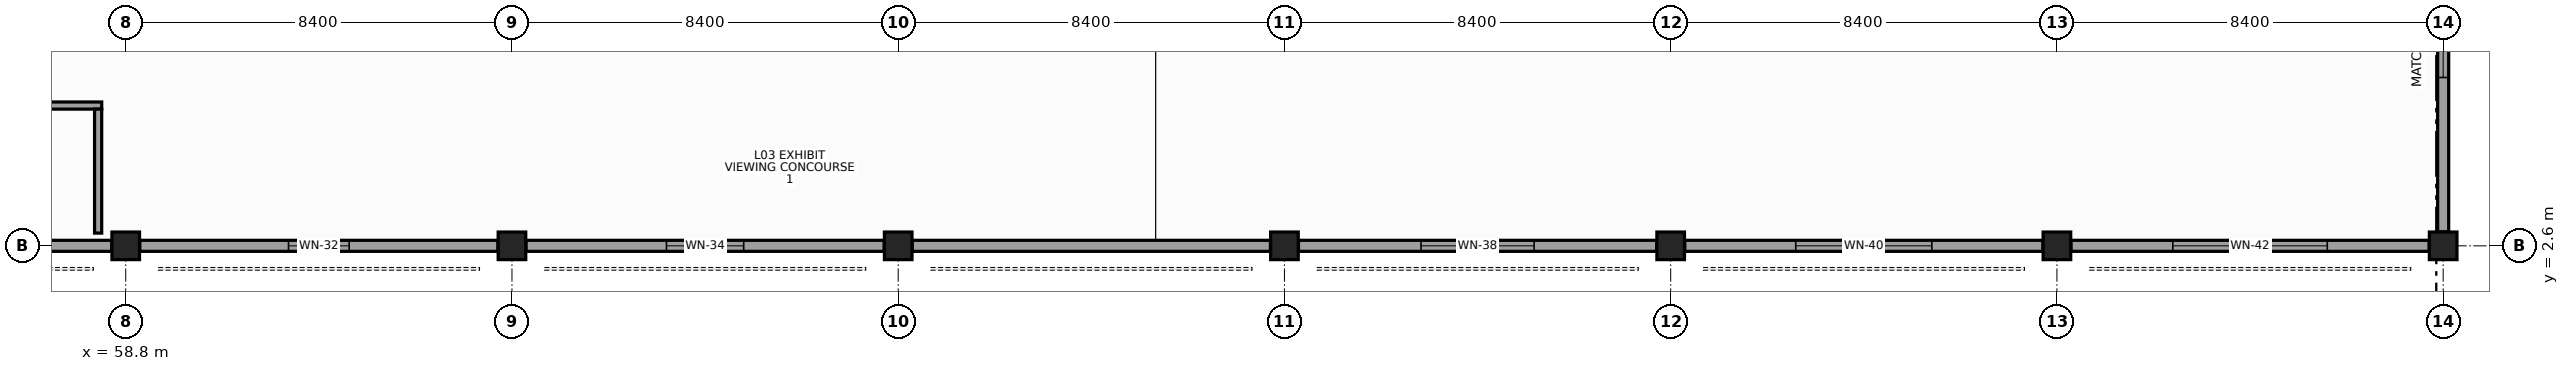
"""IFC4 building model, lengths in metres.
Left out: names, types, materials, properties, quantities, classifications, styles, units other than length and angle.
Written with IfcOpenShell. Run it as: python <this file> out.ifc"""

import sys

from ifc_helpers import new_model, si_unit, direction, frame, frame_2d, origin, origin_2d, place, context, subcontext, project, spatial, rectangle, extrude, element, fill, save


model = new_model("IFC4")
c1 = context("Model", 3, precision=1e-05, world=origin(), true_north=direction((0.0, 1.0)))
c2 = subcontext(c1, "Body", "Model", "MODEL_VIEW")
j1 = project(units=[si_unit("LENGTHUNIT", "METRE"), si_unit("PLANEANGLEUNIT", "RADIAN")], contexts=[c1])
p1 = place(None, origin())
s1 = spatial("IfcSite", under=j1, at=p1, CompositionType="ELEMENT")
p2 = place(p1, origin())
s2 = spatial("IfcBuilding", under=s1, at=p2, CompositionType="ELEMENT")
p3 = place(p2, frame((0.0, 0.0, 15.6)))
s3 = spatial("IfcBuildingStorey", under=s2, at=p3, CompositionType="ELEMENT", Elevation=15.6)
for number, where, z_axis, x_axis in (
    (1, (58.8, 2.6, 0.0), (0.0, 0.0, 1.0), (1.0, 0.0, 0.0)),
    (2, (67.2, 2.6, 0.0), (0.0, 0.0, 1.0), (1.0, 0.0, 0.0)),
    (3, (75.6, 2.6, 0.0), (0.0, 0.0, 1.0), (1.0, 0.0, 0.0)),
    (4, (84.0, 2.6, 0.0), (0.0, 0.0, 1.0), (1.0, 0.0, 0.0)),
    (5, (92.4, 2.6, 0.0), (0.0, 0.0, 1.0), (1.0, 0.0, 0.0)),
    (6, (100.8, 2.6, 0.0), (0.0, 0.0, 1.0), (1.0, 0.0, 0.0)),
    (7, (109.2, 2.6, 0.0), (0.0, 0.0, 1.0), (1.0, 0.0, 0.0)),
):
    element("IfcColumn", number, at=place(p3, frame(where, z_axis=z_axis, x_axis=x_axis)), inside=s3, PredefinedType="COLUMN", context=c2, shape_type="SweptSolid", body=[
        extrude(rectangle(XDim=0.6, YDim=0.6, at=origin_2d()), origin(), (0.0, 0.0, 1.0), 4.5),
    ])
p4 = place(p3, frame((50.705, 2.6, 0.0), z_axis=(0.0, 0.0, 1.0), x_axis=(1.0, 0.0, 0.0)))
e8 = element("IfcWall", 8, at=p4, inside=s3, PredefinedType="STANDARD", context=c2, shape_type="SweptSolid", body=[
    extrude(rectangle(XDim=7.79, YDim=0.24, at=frame_2d((3.895, 0.0))), origin(), (0.0, 0.0, 1.0), 3.33),
])
p5 = place(p3, frame((59.105, 2.6, 0.0), z_axis=(0.0, 0.0, 1.0), x_axis=(1.0, 0.0, 0.0)))
e9 = element("IfcWall", 9, at=p5, inside=s3, PredefinedType="STANDARD", context=c2, shape_type="SweptSolid", body=[
    extrude(rectangle(XDim=7.79, YDim=0.24, at=frame_2d((3.895, 0.0))), origin(), (0.0, 0.0, 1.0), 3.33),
])
p6 = place(p5, frame((3.235, 0.0, 0.95)))
e10 = element("IfcOpeningElement", 10, at=p6, cuts=e9, PredefinedType="OPENING", context=c2, shape_type="SweptSolid", body=[
    extrude(rectangle(XDim=1.32, YDim=2.0, at=frame_2d((0.66, 1.0))), frame((0.0, 0.13, 0.0), z_axis=(0.0, -1.0, 0.0), x_axis=(1.0, 0.0, 0.0)), (0.0, 0.0, 1.0), 0.26),
])
p7 = place(p3, frame((67.505, 2.6, 0.0), z_axis=(0.0, 0.0, 1.0), x_axis=(1.0, 0.0, 0.0)))
e11 = element("IfcWall", 11, at=p7, inside=s3, PredefinedType="STANDARD", context=c2, shape_type="SweptSolid", body=[
    extrude(rectangle(XDim=7.79, YDim=0.24, at=frame_2d((3.895, 0.0))), origin(), (0.0, 0.0, 1.0), 3.33),
])
p8 = place(p7, frame((3.055, 0.0, 0.95)))
e12 = element("IfcOpeningElement", 12, at=p8, cuts=e11, PredefinedType="OPENING", context=c2, shape_type="SweptSolid", body=[
    extrude(rectangle(XDim=1.68, YDim=2.08, at=frame_2d((0.84, 1.04))), frame((0.0, 0.13, 0.0), z_axis=(0.0, -1.0, 0.0), x_axis=(1.0, 0.0, 0.0)), (0.0, 0.0, 1.0), 0.26),
])
p9 = place(p3, frame((75.905, 2.6, 0.0), z_axis=(0.0, 0.0, 1.0), x_axis=(1.0, 0.0, 0.0)))
e13 = element("IfcWall", 13, at=p9, inside=s3, PredefinedType="STANDARD", context=c2, shape_type="SweptSolid", body=[
    extrude(rectangle(XDim=7.79, YDim=0.24, at=frame_2d((3.895, 0.0))), origin(), (0.0, 0.0, 1.0), 3.33),
])
p10 = place(p3, frame((84.305, 2.6, 0.0), z_axis=(0.0, 0.0, 1.0), x_axis=(1.0, 0.0, 0.0)))
e14 = element("IfcWall", 14, at=p10, inside=s3, PredefinedType="STANDARD", context=c2, shape_type="SweptSolid", body=[
    extrude(rectangle(XDim=7.79, YDim=0.24, at=frame_2d((3.895, 0.0))), origin(), (0.0, 0.0, 1.0), 3.33),
])
p11 = place(p10, frame((2.665, 0.0, 0.95)))
e15 = element("IfcOpeningElement", 15, at=p11, cuts=e14, PredefinedType="OPENING", context=c2, shape_type="SweptSolid", body=[
    extrude(rectangle(XDim=2.46, YDim=2.14, at=frame_2d((1.23, 1.07))), frame((0.0, 0.13, 0.0), z_axis=(0.0, -1.0, 0.0), x_axis=(1.0, 0.0, 0.0)), (0.0, 0.0, 1.0), 0.26),
])
p12 = place(p3, frame((92.705, 2.6, 0.0), z_axis=(0.0, 0.0, 1.0), x_axis=(1.0, 0.0, 0.0)))
e16 = element("IfcWall", 16, at=p12, inside=s3, PredefinedType="STANDARD", context=c2, shape_type="SweptSolid", body=[
    extrude(rectangle(XDim=7.79, YDim=0.24, at=frame_2d((3.895, 0.0))), origin(), (0.0, 0.0, 1.0), 3.33),
])
p13 = place(p12, frame((2.415, 0.0, 0.95)))
e17 = element("IfcOpeningElement", 17, at=p13, cuts=e16, PredefinedType="OPENING", context=c2, shape_type="SweptSolid", body=[
    extrude(rectangle(XDim=2.96, YDim=2.16, at=frame_2d((1.48, 1.08))), frame((0.0, 0.13, 0.0), z_axis=(0.0, -1.0, 0.0), x_axis=(1.0, 0.0, 0.0)), (0.0, 0.0, 1.0), 0.26),
])
p14 = place(p3, frame((101.105, 2.6, 0.0), z_axis=(0.0, 0.0, 1.0), x_axis=(1.0, 0.0, 0.0)))
e18 = element("IfcWall", 18, at=p14, inside=s3, PredefinedType="STANDARD", context=c2, shape_type="SweptSolid", body=[
    extrude(rectangle(XDim=7.79, YDim=0.24, at=frame_2d((3.895, 0.0))), origin(), (0.0, 0.0, 1.0), 3.33),
])
p15 = place(p14, frame((2.215, 0.0, 0.95)))
e19 = element("IfcOpeningElement", 19, at=p15, cuts=e18, PredefinedType="OPENING", context=c2, shape_type="SweptSolid", body=[
    extrude(rectangle(XDim=3.36, YDim=1.96, at=frame_2d((1.68, 0.98))), frame((0.0, 0.13, 0.0), z_axis=(0.0, -1.0, 0.0), x_axis=(1.0, 0.0, 0.0)), (0.0, 0.0, 1.0), 0.26),
])
p16 = place(p3, frame((109.2, 2.905, 0.0), z_axis=(0.0, 0.0, 1.0), x_axis=(0.0, 1.0, 0.0)))
e20 = element("IfcWall", 20, at=p16, inside=s3, PredefinedType="STANDARD", context=c2, shape_type="SweptSolid", body=[
    extrude(rectangle(XDim=8.39, YDim=0.24, at=frame_2d((4.195, 0.0))), origin(), (0.0, 0.0, 1.0), 3.35),
])
p17 = place(p16, frame((3.355, 0.0, 0.95)))
e21 = element("IfcOpeningElement", 21, at=p17, cuts=e20, PredefinedType="OPENING", context=c2, shape_type="SweptSolid", body=[
    extrude(rectangle(XDim=1.68, YDim=2.08, at=frame_2d((0.84, 1.04))), frame((0.0, 0.13, 0.0), z_axis=(0.0, -1.0, 0.0), x_axis=(1.0, 0.0, 0.0)), (0.0, 0.0, 1.0), 0.26),
])
p18 = place(p3, frame((33.922, 5.65, 0.0), z_axis=(0.0, 0.0, 1.0), x_axis=(1.0, 0.0, 0.0)))
e22 = element("IfcWall", 22, at=p18, inside=s3, PredefinedType="PARTITIONING", context=c2, shape_type="SweptSolid", body=[
    extrude(rectangle(XDim=24.356, YDim=0.155, at=frame_2d((12.178, 0.0))), origin(), (0.0, 0.0, 1.0), 3.45),
])
p19 = place(p18, frame((11.238, 0.0, 0.0)))
e23 = element("IfcOpeningElement", 23, at=p19, cuts=e22, PredefinedType="OPENING", context=c2, shape_type="SweptSolid", body=[
    extrude(rectangle(XDim=1.88, YDim=2.42, at=frame_2d((0.94, 1.21))), frame((0.0, 0.087, 0.0), z_axis=(0.0, -1.0, 0.0), x_axis=(1.0, 0.0, 0.0)), (0.0, 0.0, 1.0), 0.175),
])
p20 = place(p18, frame((13.718, 0.0, 1.05)))
e24 = element("IfcOpeningElement", 24, at=p20, cuts=e22, PredefinedType="OPENING", context=c2, shape_type="SweptSolid", body=[
    extrude(rectangle(XDim=2.85, YDim=1.52, at=frame_2d((1.425, 0.76))), frame((0.0, 0.087, 0.0), z_axis=(0.0, -1.0, 0.0), x_axis=(1.0, 0.0, 0.0)), (0.0, 0.0, 1.0), 0.175),
])
p21 = place(p3, frame((58.2, 2.877, 0.0), z_axis=(0.0, 0.0, 1.0), x_axis=(0.0, 1.0, 0.0)))
e25 = element("IfcWall", 25, at=p21, inside=s3, PredefinedType="PARTITIONING", context=c2, shape_type="SweptSolid", body=[
    extrude(rectangle(XDim=2.696, YDim=0.155, at=frame_2d((1.348, 0.0))), origin(), (0.0, 0.0, 1.0), 3.33),
])
p22 = place(p6, origin())
e26 = element("IfcWindow", 26, at=p22, inside=s3, PartitioningType="SINGLE_PANEL", PredefinedType="WINDOW", context=c2, shape_type="SweptSolid", body=[
    extrude(rectangle(XDim=1.32, YDim=2.0, at=frame_2d((0.66, 1.0))), frame((0.0, 0.03, 0.0), z_axis=(0.0, -1.0, 0.0), x_axis=(1.0, 0.0, 0.0)), (0.0, 0.0, 1.0), 0.06),
])
fill(e10, e26)
p23 = place(p8, origin())
e27 = element("IfcWindow", 27, at=p23, inside=s3, PartitioningType="SINGLE_PANEL", PredefinedType="WINDOW", context=c2, shape_type="SweptSolid", body=[
    extrude(rectangle(XDim=1.68, YDim=2.08, at=frame_2d((0.84, 1.04))), frame((0.0, 0.03, 0.0), z_axis=(0.0, -1.0, 0.0), x_axis=(1.0, 0.0, 0.0)), (0.0, 0.0, 1.0), 0.06),
])
fill(e12, e27)
p24 = place(p11, origin())
e28 = element("IfcWindow", 28, at=p24, inside=s3, PartitioningType="SINGLE_PANEL", PredefinedType="WINDOW", context=c2, shape_type="SweptSolid", body=[
    extrude(rectangle(XDim=2.46, YDim=2.14, at=frame_2d((1.23, 1.07))), frame((0.0, 0.03, 0.0), z_axis=(0.0, -1.0, 0.0), x_axis=(1.0, 0.0, 0.0)), (0.0, 0.0, 1.0), 0.06),
])
fill(e15, e28)
p25 = place(p13, origin())
e29 = element("IfcWindow", 29, at=p25, inside=s3, PartitioningType="SINGLE_PANEL", PredefinedType="WINDOW", context=c2, shape_type="SweptSolid", body=[
    extrude(rectangle(XDim=2.96, YDim=2.16, at=frame_2d((1.48, 1.08))), frame((0.0, 0.03, 0.0), z_axis=(0.0, -1.0, 0.0), x_axis=(1.0, 0.0, 0.0)), (0.0, 0.0, 1.0), 0.06),
])
fill(e17, e29)
p26 = place(p15, origin())
e30 = element("IfcWindow", 30, at=p26, inside=s3, PartitioningType="SINGLE_PANEL", PredefinedType="WINDOW", context=c2, shape_type="SweptSolid", body=[
    extrude(rectangle(XDim=3.36, YDim=1.96, at=frame_2d((1.68, 0.98))), frame((0.0, 0.03, 0.0), z_axis=(0.0, -1.0, 0.0), x_axis=(1.0, 0.0, 0.0)), (0.0, 0.0, 1.0), 0.06),
])
fill(e19, e30)
p27 = place(p17, origin())
e31 = element("IfcWindow", 31, at=p27, inside=s3, PartitioningType="SINGLE_PANEL", PredefinedType="WINDOW", context=c2, shape_type="SweptSolid", body=[
    extrude(rectangle(XDim=1.68, YDim=2.08, at=frame_2d((0.84, 1.04))), frame((0.0, 0.03, 0.0), z_axis=(0.0, -1.0, 0.0), x_axis=(1.0, 0.0, 0.0)), (0.0, 0.0, 1.0), 0.06),
])
fill(e21, e31)
save(model, sys.argv[1])
